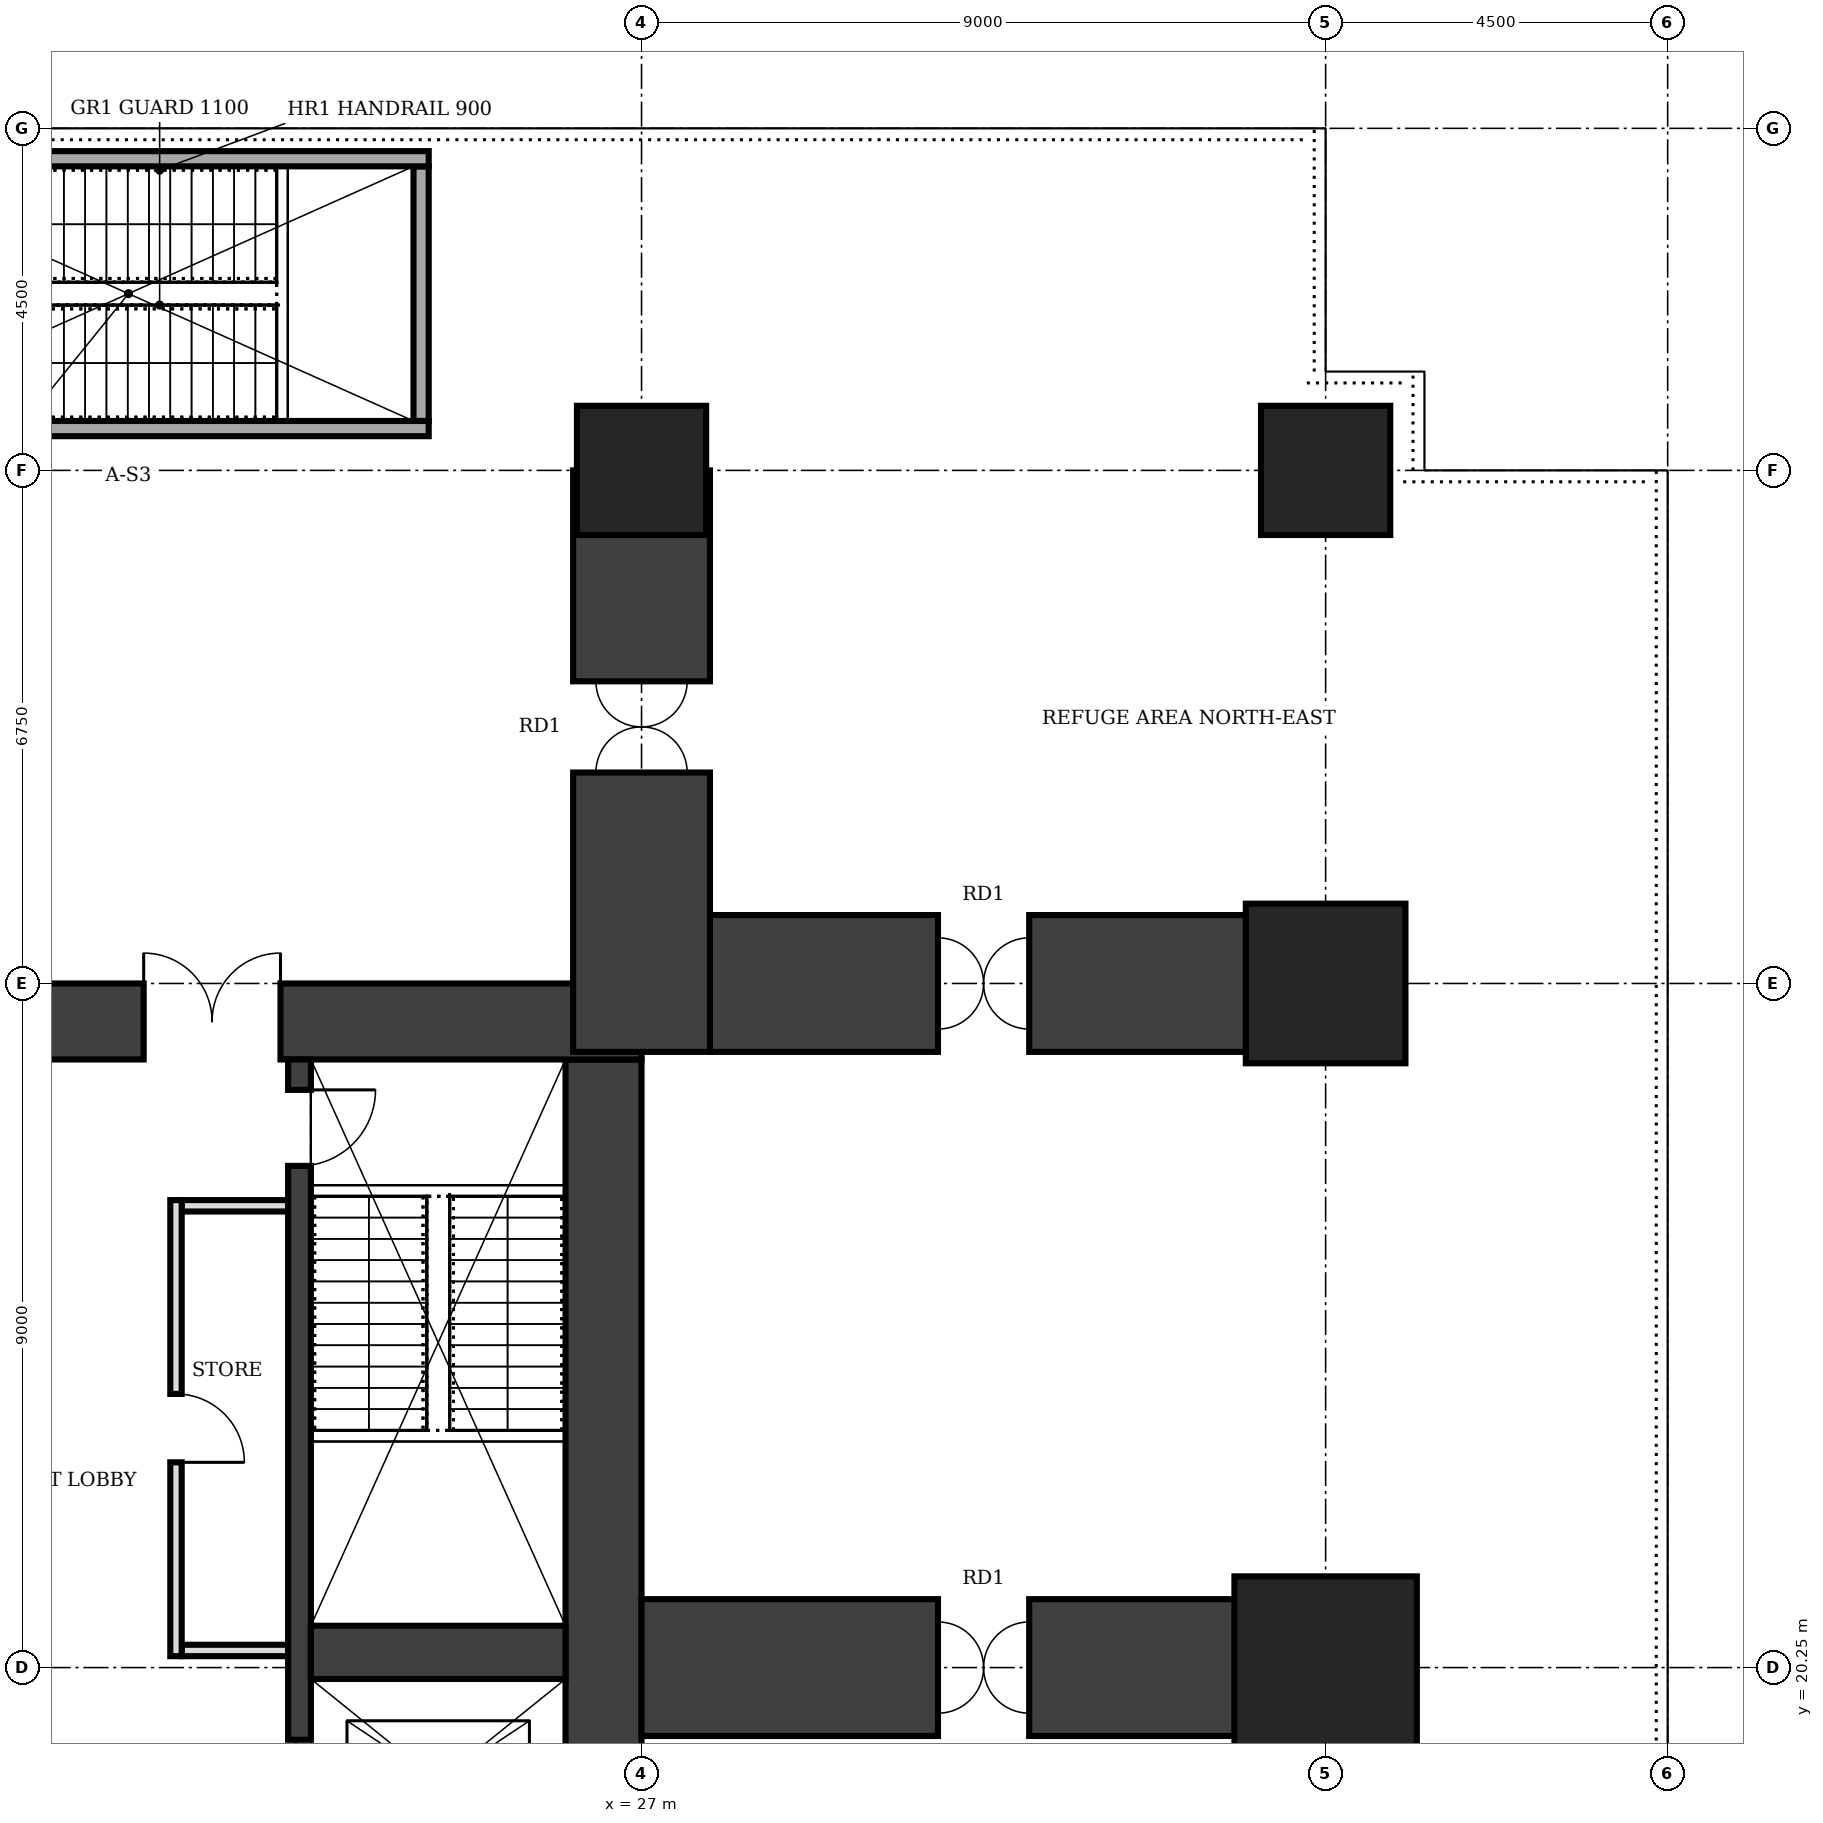
"""IFC4 building model, lengths in metres.
Left out: names, types, materials, properties, quantities, classifications, styles, units other than length and angle.
Written with IfcOpenShell. Run it as: python <this file> out.ifc"""

import sys

from ifc_helpers import new_model, si_unit, direction, frame, frame_2d, origin, origin_2d, place, context, subcontext, project, spatial, rectangle, extrude, element, fill, save


model = new_model("IFC4")
c1 = context("Model", 3, precision=1e-05, world=origin(), true_north=direction((0.0, 1.0)))
c2 = subcontext(c1, "Body", "Model", "MODEL_VIEW")
j1 = project(units=[si_unit("LENGTHUNIT", "METRE"), si_unit("PLANEANGLEUNIT", "RADIAN")], contexts=[c1])
p1 = place(None, origin())
s1 = spatial("IfcSite", under=j1, at=p1, CompositionType="ELEMENT")
p2 = place(p1, origin())
s2 = spatial("IfcBuilding", under=s1, at=p2, CompositionType="ELEMENT")
p3 = place(p2, frame((0.0, 0.0, 169.0)))
s3 = spatial("IfcBuildingStorey", under=s2, at=p3, CompositionType="ELEMENT", Elevation=169.0)
p4 = place(p3, frame((26.5, 12.25, 0.0), z_axis=(0.0, 0.0, 1.0), x_axis=(0.0, 1.0, 0.0)))
e1 = element("IfcWall", 1, at=p4, inside=s3, PredefinedType="SHEAR", context=c2, shape_type="SweptSolid", body=[
    extrude(rectangle(XDim=16.0, YDim=1.0, at=frame_2d((8.0, 0.0))), origin(), (0.0, 0.0, 1.0), 8.0),
])
p5 = place(p3, frame((27.0, 28.75, 0.0), z_axis=(0.0, 0.0, 1.0), x_axis=(-1.0, 0.0, 0.0)))
e2 = element("IfcWall", 2, at=p5, inside=s3, PredefinedType="SHEAR", context=c2, shape_type="SweptSolid", body=[
    extrude(rectangle(XDim=13.5, YDim=1.0, at=frame_2d((6.75, 0.0))), origin(), (0.0, 0.0, 1.0), 8.0),
])
p6 = place(p5, frame((4.75, 0.0, 0.0)))
e3 = element("IfcOpeningElement", 3, at=p6, cuts=e2, PredefinedType="OPENING", context=c2, shape_type="SweptSolid", body=[
    extrude(rectangle(XDim=1.8, YDim=2.1, at=frame_2d((0.9, 1.05))), frame((0.0, 0.51, 0.0), z_axis=(0.0, -1.0, 0.0), x_axis=(1.0, 0.0, 0.0)), (0.0, 0.0, 1.0), 1.02),
])
p7 = place(p3, frame((22.5, 12.25, 0.0), z_axis=(0.0, 0.0, 1.0), x_axis=(0.0, 1.0, 0.0)))
e4 = element("IfcWall", 4, at=p7, inside=s3, PredefinedType="SHEAR", context=c2, shape_type="SweptSolid", body=[
    extrude(rectangle(XDim=16.0, YDim=0.3, at=frame_2d((8.0, 0.0))), origin(), (0.0, 0.0, 1.0), 8.0),
])
p8 = place(p7, frame((14.6, 0.0, 0.0)))
e5 = element("IfcOpeningElement", 5, at=p8, cuts=e4, PredefinedType="OPENING", context=c2, shape_type="SweptSolid", body=[
    extrude(rectangle(XDim=1.0, YDim=2.1, at=frame_2d((0.5, 1.05))), frame((0.0, 0.16, 0.0), z_axis=(0.0, -1.0, 0.0), x_axis=(1.0, 0.0, 0.0)), (0.0, 0.0, 1.0), 0.32),
])
p9 = place(p7, frame((0.375, 0.0, 0.0)))
e6 = element("IfcOpeningElement", 6, at=p9, cuts=e4, PredefinedType="OPENING", context=c2, shape_type="SweptSolid", body=[
    extrude(rectangle(XDim=1.1, YDim=2.1, at=frame_2d((0.55, 1.05))), frame((0.0, 0.16, 0.0), z_axis=(0.0, -1.0, 0.0), x_axis=(1.0, 0.0, 0.0)), (0.0, 0.0, 1.0), 0.32),
])
p10 = place(p7, frame((3.7, 0.0, 0.0)))
e7 = element("IfcOpeningElement", 7, at=p10, cuts=e4, PredefinedType="OPENING", context=c2, shape_type="SweptSolid", body=[
    extrude(rectangle(XDim=1.1, YDim=2.1, at=frame_2d((0.55, 1.05))), frame((0.0, 0.16, 0.0), z_axis=(0.0, -1.0, 0.0), x_axis=(1.0, 0.0, 0.0)), (0.0, 0.0, 1.0), 0.32),
])
p11 = place(p7, frame((5.95, 0.0, 0.0)))
e8 = element("IfcOpeningElement", 8, at=p11, cuts=e4, PredefinedType="OPENING", context=c2, shape_type="SweptSolid", body=[
    extrude(rectangle(XDim=1.1, YDim=2.1, at=frame_2d((0.55, 1.05))), frame((0.0, 0.16, 0.0), z_axis=(0.0, -1.0, 0.0), x_axis=(1.0, 0.0, 0.0)), (0.0, 0.0, 1.0), 0.32),
])
p12 = place(p3, frame((22.65, 20.45, 0.0), z_axis=(0.0, 0.0, 1.0), x_axis=(1.0, 0.0, 0.0)))
e9 = element("IfcWall", 9, at=p12, inside=s3, PredefinedType="SHEAR", context=c2, shape_type="SweptSolid", body=[
    extrude(rectangle(XDim=3.35, YDim=0.7, at=frame_2d((1.675, 0.0))), origin(), (0.0, 0.0, 1.0), 8.0),
])
p13 = place(p3, frame((36.0, 20.25, 0.0), z_axis=(0.0, 0.0, 1.0), x_axis=(1.0, 0.0, 0.0)))
e10 = element("IfcColumn", 10, at=p13, inside=s3, PredefinedType="COLUMN", context=c2, shape_type="SweptSolid", body=[
    extrude(rectangle(XDim=2.4, YDim=2.4, at=origin_2d()), origin(), (0.0, 0.0, 1.0), 8.0),
])
p14 = place(p3, frame((36.0, 29.25, 0.0), z_axis=(0.0, 0.0, 1.0), x_axis=(1.0, 0.0, 0.0)))
e11 = element("IfcColumn", 11, at=p14, inside=s3, PredefinedType="COLUMN", context=c2, shape_type="SweptSolid", body=[
    extrude(rectangle(XDim=2.1, YDim=2.1, at=origin_2d()), origin(), (0.0, 0.0, 1.0), 8.0),
])
for number, where, z_axis, x_axis in (
    (12, (27.0, 36.0, 0.0), (0.0, 0.0, 1.0), (1.0, 0.0, 0.0)),
    (13, (36.0, 36.0, 0.0), (0.0, 0.0, 1.0), (1.0, 0.0, 0.0)),
):
    element("IfcColumn", number, at=place(p3, frame(where, z_axis=z_axis, x_axis=x_axis)), inside=s3, PredefinedType="COLUMN", context=c2, shape_type="SweptSolid", body=[
        extrude(rectangle(XDim=1.7, YDim=1.7, at=origin_2d()), origin(), (0.0, 0.0, 1.0), 8.0),
    ])
p15 = place(p3, frame((27.0, 28.35, 0.0), z_axis=(0.0, 0.0, 1.0), x_axis=(0.0, 1.0, 0.0)))
e14 = element("IfcWall", 14, at=p15, inside=s3, PredefinedType="SHEAR", context=c2, shape_type="SweptSolid", body=[
    extrude(rectangle(XDim=7.65, YDim=1.8, at=frame_2d((3.825, 0.0))), origin(), (0.0, 0.0, 1.0), 8.0),
])
p16 = place(p15, frame((3.675, 0.0, 0.0)))
e15 = element("IfcOpeningElement", 15, at=p16, cuts=e14, PredefinedType="OPENING", context=c2, shape_type="SweptSolid", body=[
    extrude(rectangle(XDim=1.2, YDim=2.1, at=frame_2d((0.6, 1.05))), frame((0.0, 0.91, 0.0), z_axis=(0.0, -1.0, 0.0), x_axis=(1.0, 0.0, 0.0)), (0.0, 0.0, 1.0), 1.82),
])
p17 = place(p3, frame((27.0, 20.25, 0.0), z_axis=(0.0, 0.0, 1.0), x_axis=(1.0, 0.0, 0.0)))
e16 = element("IfcWall", 16, at=p17, inside=s3, PredefinedType="SHEAR", context=c2, shape_type="SweptSolid", body=[
    extrude(rectangle(XDim=9.0, YDim=1.8, at=frame_2d((4.5, 0.0))), origin(), (0.0, 0.0, 1.0), 8.0),
])
p18 = place(p17, frame((3.9, 0.0, 0.0)))
e17 = element("IfcOpeningElement", 17, at=p18, cuts=e16, PredefinedType="OPENING", context=c2, shape_type="SweptSolid", body=[
    extrude(rectangle(XDim=1.2, YDim=2.1, at=frame_2d((0.6, 1.05))), frame((0.0, 0.91, 0.0), z_axis=(0.0, -1.0, 0.0), x_axis=(1.0, 0.0, 0.0)), (0.0, 0.0, 1.0), 1.82),
])
p19 = place(p3, frame((27.9, 29.25, 0.0), z_axis=(0.0, 0.0, 1.0), x_axis=(1.0, 0.0, 0.0)))
e18 = element("IfcWall", 18, at=p19, inside=s3, PredefinedType="SHEAR", context=c2, shape_type="SweptSolid", body=[
    extrude(rectangle(XDim=8.1, YDim=1.8, at=frame_2d((4.05, 0.0))), origin(), (0.0, 0.0, 1.0), 8.0),
])
p20 = place(p19, frame((3.0, 0.0, 0.0)))
e19 = element("IfcOpeningElement", 19, at=p20, cuts=e18, PredefinedType="OPENING", context=c2, shape_type="SweptSolid", body=[
    extrude(rectangle(XDim=1.2, YDim=2.1, at=frame_2d((0.6, 1.05))), frame((0.0, 0.91, 0.0), z_axis=(0.0, -1.0, 0.0), x_axis=(1.0, 0.0, 0.0)), (0.0, 0.0, 1.0), 1.82),
])
p21 = place(p3, frame((20.875, 20.4, 0.0), z_axis=(0.0, 0.0, 1.0), x_axis=(0.0, 1.0, 0.0)))
e20 = element("IfcWall", 20, at=p21, inside=s3, PredefinedType="PARTITIONING", context=c2, shape_type="SweptSolid", body=[
    extrude(rectangle(XDim=6.0, YDim=0.15, at=frame_2d((3.0, 0.0))), origin(), (0.0, 0.0, 1.0), 7.75),
])
p22 = place(p21, frame((2.55, 0.0, 0.0)))
e21 = element("IfcOpeningElement", 21, at=p22, cuts=e20, PredefinedType="OPENING", context=c2, shape_type="SweptSolid", body=[
    extrude(rectangle(XDim=0.9, YDim=2.1, at=frame_2d((0.45, 1.05))), frame((0.0, 0.085, 0.0), z_axis=(0.0, -1.0, 0.0), x_axis=(1.0, 0.0, 0.0)), (0.0, 0.0, 1.0), 0.17),
])
for number, where, z_axis, x_axis in (
    (22, (20.95, 20.475, 0.0), (0.0, 0.0, 1.0), (1.0, 0.0, 0.0)),
    (23, (20.95, 26.325, 0.0), (0.0, 0.0, 1.0), (1.0, 0.0, 0.0)),
):
    element("IfcWall", number, at=place(p3, frame(where, z_axis=z_axis, x_axis=x_axis)), inside=s3, PredefinedType="PARTITIONING", context=c2, shape_type="SweptSolid", body=[
        extrude(rectangle(XDim=1.4, YDim=0.15, at=frame_2d((0.7, 0.0))), origin(), (0.0, 0.0, 1.0), 7.75),
    ])
for number, where, z_axis, x_axis in (
    (24, (16.3, 36.55, 0.0), (0.0, 0.0, 1.0), (1.0, 0.0, 0.0)),
    (25, (16.3, 40.1, 0.0), (0.0, 0.0, 1.0), (1.0, 0.0, 0.0)),
):
    element("IfcWall", number, at=place(p3, frame(where, z_axis=z_axis, x_axis=x_axis)), inside=s3, PredefinedType="SOLIDWALL", context=c2, shape_type="SweptSolid", body=[
        extrude(rectangle(XDim=7.9, YDim=0.2, at=frame_2d((3.95, 0.0))), origin(), (0.0, 0.0, 1.0), 7.75),
    ])
p23 = place(p3, frame((24.1, 36.65, 0.0), z_axis=(0.0, 0.0, 1.0), x_axis=(0.0, 1.0, 0.0)))
e26 = element("IfcWall", 26, at=p23, inside=s3, PredefinedType="SOLIDWALL", context=c2, shape_type="SweptSolid", body=[
    extrude(rectangle(XDim=3.35, YDim=0.2, at=frame_2d((1.675, 0.0))), origin(), (0.0, 0.0, 1.0), 7.75),
])
p24 = place(p6, frame((1.8, 0.0, 0.0), z_axis=(0.0, 0.0, 1.0), x_axis=(-1.0, 0.0, 0.0)))
e27 = element("IfcDoor", 27, at=p24, inside=s3, OperationType="DOUBLE_DOOR_SINGLE_SWING", PredefinedType="DOOR", context=c2, shape_type="SweptSolid", body=[
    extrude(rectangle(XDim=1.8, YDim=2.1, at=frame_2d((0.9, 1.05))), frame((0.0, 0.025, 0.0), z_axis=(0.0, -1.0, 0.0), x_axis=(1.0, 0.0, 0.0)), (0.0, 0.0, 1.0), 0.05),
])
fill(e3, e27)
p25 = place(p8, frame((1.0, 0.0, 0.0), z_axis=(0.0, 0.0, 1.0), x_axis=(-1.0, 0.0, 0.0)))
e28 = element("IfcDoor", 28, at=p25, inside=s3, OperationType="SINGLE_SWING_LEFT", PredefinedType="DOOR", context=c2, shape_type="SweptSolid", body=[
    extrude(rectangle(XDim=1.0, YDim=2.1, at=frame_2d((0.5, 1.05))), frame((0.0, 0.025, 0.0), z_axis=(0.0, -1.0, 0.0), x_axis=(1.0, 0.0, 0.0)), (0.0, 0.0, 1.0), 0.05),
])
fill(e5, e28)
p26 = place(p11, origin())
e29 = element("IfcDoor", 29, at=p26, inside=s3, OperationType="DOUBLE_DOOR_SLIDING", PredefinedType="DOOR", context=c2, shape_type="SweptSolid", body=[
    extrude(rectangle(XDim=1.1, YDim=2.1, at=frame_2d((0.55, 1.05))), frame((0.0, 0.025, 0.0), z_axis=(0.0, -1.0, 0.0), x_axis=(1.0, 0.0, 0.0)), (0.0, 0.0, 1.0), 0.05),
])
fill(e8, e29)
p27 = place(p22, frame((0.9, 0.0, 0.0), z_axis=(0.0, 0.0, 1.0), x_axis=(-1.0, 0.0, 0.0)))
e30 = element("IfcDoor", 30, at=p27, inside=s3, OperationType="SINGLE_SWING_RIGHT", PredefinedType="DOOR", context=c2, shape_type="SweptSolid", body=[
    extrude(rectangle(XDim=0.9, YDim=2.1, at=frame_2d((0.45, 1.05))), frame((0.0, 0.025, 0.0), z_axis=(0.0, -1.0, 0.0), x_axis=(1.0, 0.0, 0.0)), (0.0, 0.0, 1.0), 0.05),
])
fill(e21, e30)
p28 = place(p16, origin())
e31 = element("IfcDoor", 31, at=p28, inside=s3, OperationType="DOUBLE_DOOR_DOUBLE_SWING", PredefinedType="DOOR", context=c2, shape_type="SweptSolid", body=[
    extrude(rectangle(XDim=1.2, YDim=2.1, at=frame_2d((0.6, 1.05))), frame((0.0, 0.025, 0.0), z_axis=(0.0, -1.0, 0.0), x_axis=(1.0, 0.0, 0.0)), (0.0, 0.0, 1.0), 0.05),
])
fill(e15, e31)
p29 = place(p18, origin())
e32 = element("IfcDoor", 32, at=p29, inside=s3, OperationType="DOUBLE_DOOR_DOUBLE_SWING", PredefinedType="DOOR", context=c2, shape_type="SweptSolid", body=[
    extrude(rectangle(XDim=1.2, YDim=2.1, at=frame_2d((0.6, 1.05))), frame((0.0, 0.025, 0.0), z_axis=(0.0, -1.0, 0.0), x_axis=(1.0, 0.0, 0.0)), (0.0, 0.0, 1.0), 0.05),
])
fill(e17, e32)
p30 = place(p20, origin())
e33 = element("IfcDoor", 33, at=p30, inside=s3, OperationType="DOUBLE_DOOR_DOUBLE_SWING", PredefinedType="DOOR", context=c2, shape_type="SweptSolid", body=[
    extrude(rectangle(XDim=1.2, YDim=2.1, at=frame_2d((0.6, 1.05))), frame((0.0, 0.025, 0.0), z_axis=(0.0, -1.0, 0.0), x_axis=(1.0, 0.0, 0.0)), (0.0, 0.0, 1.0), 0.05),
])
fill(e19, e33)
save(model, sys.argv[1])
